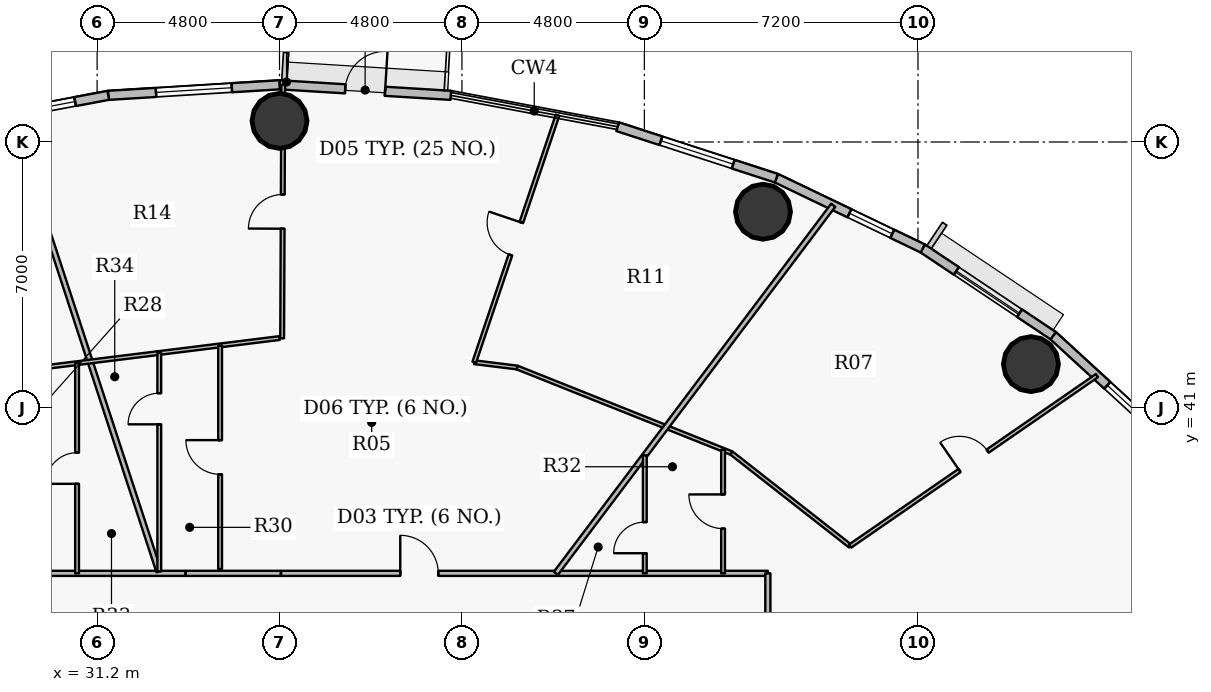
"""IFC4 building model, lengths in metres.
Left out: names, types, materials, properties, quantities, classifications, styles, units other than length and angle.
Written with IfcOpenShell. Run it as: python <this file> out.ifc"""

import sys

from ifc_helpers import new_model, si_unit, direction, frame, frame_2d, origin, origin_2d, place, context, subcontext, project, spatial, rectangle, hollow_circle, extrude, source, transform, mapped, element, fill, save


model = new_model("IFC4")
c1 = context("Model", 3, precision=1e-05, world=origin(), true_north=direction((0.0, 1.0)))
c2 = subcontext(c1, "Body", "Model", "MODEL_VIEW")
j1 = project(units=[si_unit("LENGTHUNIT", "METRE"), si_unit("PLANEANGLEUNIT", "RADIAN")], contexts=[c1])
p1 = place(None, origin())
s1 = spatial("IfcSite", under=j1, at=p1, CompositionType="ELEMENT")
p2 = place(p1, origin())
s2 = spatial("IfcBuilding", under=s1, at=p2, CompositionType="ELEMENT")
p3 = place(p2, frame((0.0, 0.0, 108.45)))
s3 = spatial("IfcBuildingStorey", under=s2, at=p3, CompositionType="ELEMENT", Elevation=108.45)
for number, where, z_axis, x_axis in (
    (1, (55.773, 42.156, 0.0), (0.0, 0.0, 1.0), (1.0, 0.0, 0.0)),
    (2, (48.722, 46.165, 0.0), (0.0, 0.0, 1.0), (1.0, 0.0, 0.0)),
    (3, (36.0, 48.555, 0.0), (0.0, 0.0, 1.0), (1.0, 0.0, 0.0)),
):
    element("IfcColumn", number, at=place(p3, frame(where, z_axis=z_axis, x_axis=x_axis)), inside=s3, PredefinedType="COLUMN", context=c2, shape_type="SweptSolid", body=[
        extrude(hollow_circle(Radius=0.725, WallThickness=0.042, at=origin_2d()), origin(), (0.0, 0.0, 1.0), 3.75),
    ])
p4 = place(p3, frame((56.358, 42.903, 0.0), z_axis=(0.0, 0.0, 1.0), x_axis=(0.737113356241, -0.675769117414, 0.0)))
e4 = element("IfcWall", 4, at=p4, inside=s3, PredefinedType="SOLIDWALL", context=c2, shape_type="SweptSolid", body=[
    extrude(rectangle(XDim=3.976, YDim=0.24, at=frame_2d((1.988, 0.0))), origin(), (0.0, 0.0, 1.0), 3.5),
])
p5 = place(p4, frame((1.933, 0.0, 0.9)))
e5 = element("IfcOpeningElement", 5, at=p5, cuts=e4, PredefinedType="OPENING", context=c2, shape_type="SweptSolid", body=[
    extrude(rectangle(XDim=1.25, YDim=1.65, at=origin_2d()), frame((0.625, 0.13, 0.825), z_axis=(0.0, -1.0, 0.0), x_axis=(1.0, 0.0, 0.0)), (0.0, 0.0, 1.0), 0.26),
])
p6 = place(p3, frame((52.925, 45.199, 0.0), z_axis=(0.0, 0.0, 1.0), x_axis=(0.831221811447, -0.555940914284, 0.0)))
e6 = element("IfcWall", 6, at=p6, inside=s3, PredefinedType="SOLIDWALL", context=c2, shape_type="SweptSolid", body=[
    extrude(rectangle(XDim=4.13, YDim=0.24, at=frame_2d((2.065, 0.0))), origin(), (0.0, 0.0, 1.0), 3.5),
])
p7 = place(p6, frame((1.065, 0.0, 0.9)))
e7 = element("IfcOpeningElement", 7, at=p7, cuts=e6, PredefinedType="OPENING", context=c2, shape_type="SweptSolid", body=[
    extrude(rectangle(XDim=2.0, YDim=1.75, at=origin_2d()), frame((1.0, 0.13, 0.875), z_axis=(0.0, -1.0, 0.0), x_axis=(1.0, 0.0, 0.0)), (0.0, 0.0, 1.0), 0.26),
])
p8 = place(p3, frame((49.074, 47.047, 0.0), z_axis=(0.0, 0.0, 1.0), x_axis=(0.901589935876, -0.432591709962, 0.0)))
e8 = element("IfcWall", 8, at=p8, inside=s3, PredefinedType="SOLIDWALL", context=c2, shape_type="SweptSolid", body=[
    extrude(rectangle(XDim=4.272, YDim=0.24, at=frame_2d((2.136, 0.0))), origin(), (0.0, 0.0, 1.0), 3.5),
])
p9 = place(p8, frame((2.132, 0.0, 0.9)))
e9 = element("IfcOpeningElement", 9, at=p9, cuts=e8, PredefinedType="OPENING", context=c2, shape_type="SweptSolid", body=[
    extrude(rectangle(XDim=1.25, YDim=1.65, at=origin_2d()), frame((0.625, 0.13, 0.825), z_axis=(0.0, -1.0, 0.0), x_axis=(1.0, 0.0, 0.0)), (0.0, 0.0, 1.0), 0.26),
])
p10 = place(p3, frame((44.9, 48.401, 0.0), z_axis=(0.0, 0.0, 1.0), x_axis=(0.951211346073, -0.308540070495, 0.0)))
e10 = element("IfcWall", 10, at=p10, inside=s3, PredefinedType="SOLIDWALL", context=c2, shape_type="SweptSolid", body=[
    extrude(rectangle(XDim=4.388, YDim=0.24, at=frame_2d((2.194, 0.0))), origin(), (0.0, 0.0, 1.0), 3.5),
])
p11 = place(p10, frame((1.194, 0.0, 0.9)))
e11 = element("IfcOpeningElement", 11, at=p11, cuts=e10, PredefinedType="OPENING", context=c2, shape_type="SweptSolid", body=[
    extrude(rectangle(XDim=2.0, YDim=1.75, at=origin_2d()), frame((1.0, 0.13, 0.875), z_axis=(0.0, -1.0, 0.0), x_axis=(1.0, 0.0, 0.0)), (0.0, 0.0, 1.0), 0.26),
])
p12 = place(p3, frame((36.0, 49.505, 0.0), z_axis=(0.0, 0.0, 1.0), x_axis=(0.998107531589, -0.061492726276, 0.0)))
e12 = element("IfcWall", 12, at=p12, inside=s3, PredefinedType="SOLIDWALL", context=c2, shape_type="SweptSolid", body=[
    extrude(rectangle(XDim=4.514, YDim=0.24, at=frame_2d((2.257, 0.0))), origin(), (0.0, 0.0, 1.0), 3.5),
])
p13 = place(p12, frame((1.732, 0.0, 0.0)))
e13 = element("IfcOpeningElement", 13, at=p13, cuts=e12, PredefinedType="OPENING", context=c2, shape_type="SweptSolid", body=[
    extrude(rectangle(XDim=1.05, YDim=2.15, at=origin_2d()), frame((0.525, 0.13, 1.075), z_axis=(0.0, -1.0, 0.0), x_axis=(1.0, 0.0, 0.0)), (0.0, 0.0, 1.0), 0.26),
])
p14 = place(p3, frame((31.494, 49.227, 0.0), z_axis=(0.0, 0.0, 1.0), x_axis=(0.998107531589, 0.061492726276, 0.0)))
e14 = element("IfcWall", 14, at=p14, inside=s3, PredefinedType="SOLIDWALL", context=c2, shape_type="SweptSolid", body=[
    extrude(rectangle(XDim=4.514, YDim=0.24, at=frame_2d((2.257, 0.0))), origin(), (0.0, 0.0, 1.0), 3.5),
])
p15 = place(p14, frame((1.257, 0.0, 0.9)))
e15 = element("IfcOpeningElement", 15, at=p15, cuts=e14, PredefinedType="OPENING", context=c2, shape_type="SweptSolid", body=[
    extrude(rectangle(XDim=2.0, YDim=1.75, at=origin_2d()), frame((1.0, 0.13, 0.875), z_axis=(0.0, -1.0, 0.0), x_axis=(1.0, 0.0, 0.0)), (0.0, 0.0, 1.0), 0.26),
])
p16 = place(p3, frame((27.1, 48.401, 0.0), z_axis=(0.0, 0.0, 1.0), x_axis=(0.982789252177, 0.184730305596, 0.0)))
e16 = element("IfcWall", 16, at=p16, inside=s3, PredefinedType="SOLIDWALL", context=c2, shape_type="SweptSolid", body=[
    extrude(rectangle(XDim=4.471, YDim=0.24, at=frame_2d((2.235, 0.0))), origin(), (0.0, 0.0, 1.0), 3.5),
])
p17 = place(p16, frame((2.333, 0.0, 0.9)))
e17 = element("IfcOpeningElement", 17, at=p17, cuts=e16, PredefinedType="OPENING", context=c2, shape_type="SweptSolid", body=[
    extrude(rectangle(XDim=1.25, YDim=1.65, at=origin_2d()), frame((0.625, 0.13, 0.825), z_axis=(0.0, -1.0, 0.0), x_axis=(1.0, 0.0, 0.0)), (0.0, 0.0, 1.0), 0.26),
])
p18 = place(p3, frame((23.15, 36.65, 0.0), z_axis=(0.0, 0.0, 1.0), x_axis=(1.0, 0.0, 0.0)))
e18 = element("IfcWall", 18, at=p18, inside=s3, PredefinedType="PARTITIONING", context=c2, shape_type="SweptSolid", body=[
    extrude(rectangle(XDim=10.373, YDim=0.135, at=frame_2d((5.187, 0.0))), origin(), (0.0, 0.0, 1.0), 2.935),
])
p19 = place(p3, frame((28.883, 48.741, 0.0), z_axis=(0.0, 0.0, 1.0), x_axis=(0.311090320612, -0.95038035145, 0.0)))
e19 = element("IfcWall", 19, at=p19, inside=s3, PredefinedType="PARTITIONING", context=c2, shape_type="SweptSolid", body=[
    extrude(rectangle(XDim=12.671, YDim=0.135, at=frame_2d((6.335, 0.0))), origin(), (0.0, 0.0, 1.0), 2.935),
])
p20 = place(p3, frame((29.749, 42.066, 0.0), z_axis=(0.0, 0.0, 1.0), x_axis=(0.992395485088, 0.123090215599, 0.0)))
e20 = element("IfcWall", 20, at=p20, inside=s3, PredefinedType="PARTITIONING", context=c2, shape_type="SweptSolid", body=[
    extrude(rectangle(XDim=6.299, YDim=0.1, at=frame_2d((3.15, 0.0))), origin(), (0.0, 0.0, 1.0), 2.935),
])
p21 = place(p3, frame((30.673, 36.65, 0.0), z_axis=(0.0, 0.0, 1.0), x_axis=(0.0, 1.0, 0.0)))
e21 = element("IfcWall", 21, at=p21, inside=s3, PredefinedType="PARTITIONING", context=c2, shape_type="SweptSolid", body=[
    extrude(rectangle(XDim=5.53, YDim=0.1, at=frame_2d((2.765, 0.0))), origin(), (0.0, 0.0, 1.0), 2.935),
])
p22 = place(p21, frame((2.355, 0.0, 0.0)))
e22 = element("IfcOpeningElement", 22, at=p22, cuts=e21, PredefinedType="OPENING", context=c2, shape_type="SweptSolid", body=[
    extrude(rectangle(XDim=0.82, YDim=2.1, at=origin_2d()), frame((0.41, 0.06, 1.05), z_axis=(0.0, -1.0, 0.0), x_axis=(1.0, 0.0, 0.0)), (0.0, 0.0, 1.0), 0.12),
])
p23 = place(p3, frame((32.836, 36.701, 0.0), z_axis=(0.0, 0.0, 1.0), x_axis=(0.0, 1.0, 0.0)))
e23 = element("IfcWall", 23, at=p23, inside=s3, PredefinedType="PARTITIONING", context=c2, shape_type="SweptSolid", body=[
    extrude(rectangle(XDim=5.748, YDim=0.1, at=frame_2d((2.874, 0.0))), origin(), (0.0, 0.0, 1.0), 3.125),
])
p24 = place(p23, frame((3.87, 0.0, 0.0)))
e24 = element("IfcOpeningElement", 24, at=p24, cuts=e23, PredefinedType="OPENING", context=c2, shape_type="SweptSolid", body=[
    extrude(rectangle(XDim=0.82, YDim=2.1, at=origin_2d()), frame((0.41, 0.06, 1.05), z_axis=(0.0, -1.0, 0.0), x_axis=(1.0, 0.0, 0.0)), (0.0, 0.0, 1.0), 0.12),
])
p25 = place(p3, frame((34.436, 36.763, 0.0), z_axis=(0.0, 0.0, 1.0), x_axis=(0.0, 1.0, 0.0)))
e25 = element("IfcWall", 25, at=p25, inside=s3, PredefinedType="PARTITIONING", context=c2, shape_type="SweptSolid", body=[
    extrude(rectangle(XDim=5.884, YDim=0.1, at=frame_2d((2.942, 0.0))), origin(), (0.0, 0.0, 1.0), 3.125),
])
p26 = place(p25, frame((2.492, 0.0, 0.0)))
e26 = element("IfcOpeningElement", 26, at=p26, cuts=e25, PredefinedType="OPENING", context=c2, shape_type="SweptSolid", body=[
    extrude(rectangle(XDim=0.9, YDim=2.1, at=origin_2d()), frame((0.45, 0.06, 1.05), z_axis=(0.0, -1.0, 0.0), x_axis=(1.0, 0.0, 0.0)), (0.0, 0.0, 1.0), 0.12),
])
p27 = place(p3, frame((36.042, 36.65, 0.0), z_axis=(0.0, 0.0, 1.0), x_axis=(1.0, 0.0, 0.0)))
e27 = element("IfcWall", 27, at=p27, inside=s3, PredefinedType="PARTITIONING", context=c2, shape_type="SweptSolid", body=[
    extrude(rectangle(XDim=12.808, YDim=0.135, at=frame_2d((6.404, 0.0))), origin(), (0.0, 0.0, 1.0), 2.935),
])
p28 = place(p27, frame((3.135, 0.0, 0.0)))
e28 = element("IfcOpeningElement", 28, at=p28, cuts=e27, PredefinedType="OPENING", context=c2, shape_type="SweptSolid", body=[
    extrude(rectangle(XDim=1.0, YDim=2.15, at=origin_2d()), frame((0.5, 0.078, 1.075), z_axis=(0.0, -1.0, 0.0), x_axis=(1.0, 0.0, 0.0)), (0.0, 0.0, 1.0), 0.155),
])
p29 = place(p3, frame((36.069, 42.833, 0.0), z_axis=(0.0, 0.0, 1.0), x_axis=(0.004354785612, 0.999990517876, 0.0)))
e29 = element("IfcWall", 29, at=p29, inside=s3, PredefinedType="PARTITIONING", context=c2, shape_type="SweptSolid", body=[
    extrude(rectangle(XDim=6.671, YDim=0.1, at=frame_2d((3.336, 0.0))), origin(), (0.0, 0.0, 1.0), 2.935),
])
p30 = place(p29, frame((2.886, 0.0, 0.0)))
e30 = element("IfcOpeningElement", 30, at=p30, cuts=e29, PredefinedType="OPENING", context=c2, shape_type="SweptSolid", body=[
    extrude(rectangle(XDim=0.9, YDim=2.1, at=origin_2d()), frame((0.45, 0.06, 1.05), z_axis=(0.0, -1.0, 0.0), x_axis=(1.0, 0.0, 0.0)), (0.0, 0.0, 1.0), 0.12),
])
p31 = place(p3, frame((41.125, 42.205, 0.0), z_axis=(0.0, 0.0, 1.0), x_axis=(0.99240961586, -0.122976234894, 0.0)))
e31 = element("IfcWall", 31, at=p31, inside=s3, PredefinedType="PARTITIONING", context=c2, shape_type="SweptSolid", body=[
    extrude(rectangle(XDim=1.135, YDim=0.1, at=frame_2d((0.568, 0.0))), origin(), (0.0, 0.0, 1.0), 3.5),
])
p32 = place(p3, frame((41.125, 42.205, 0.0), z_axis=(0.0, 0.0, 1.0), x_axis=(0.319387131438, 0.947624324441, 0.0)))
e32 = element("IfcWall", 32, at=p32, inside=s3, PredefinedType="PARTITIONING", context=c2, shape_type="SweptSolid", body=[
    extrude(rectangle(XDim=6.858, YDim=0.1, at=frame_2d((3.429, 0.0))), origin(), (0.0, 0.0, 1.0), 2.935),
])
p33 = place(p32, frame((2.979, 0.0, 0.0)))
e33 = element("IfcOpeningElement", 33, at=p33, cuts=e32, PredefinedType="OPENING", context=c2, shape_type="SweptSolid", body=[
    extrude(rectangle(XDim=0.9, YDim=2.1, at=origin_2d()), frame((0.45, 0.06, 1.05), z_axis=(0.0, -1.0, 0.0), x_axis=(1.0, 0.0, 0.0)), (0.0, 0.0, 1.0), 0.12),
])
p34 = place(p3, frame((42.251, 42.066, 0.0), z_axis=(0.0, 0.0, 1.0), x_axis=(0.9288090756, -0.370558633798, 0.0)))
e34 = element("IfcWall", 34, at=p34, inside=s3, PredefinedType="PARTITIONING", context=c2, shape_type="SweptSolid", body=[
    extrude(rectangle(XDim=6.072, YDim=0.1, at=frame_2d((3.036, 0.0))), origin(), (0.0, 0.0, 1.0), 2.935),
])
p35 = place(p3, frame((43.272, 36.65, 0.0), z_axis=(0.0, 0.0, 1.0), x_axis=(0.601821582461, 0.798630567211, 0.0)))
e35 = element("IfcWall", 35, at=p35, inside=s3, PredefinedType="PARTITIONING", context=c2, shape_type="SweptSolid", body=[
    extrude(rectangle(XDim=12.127, YDim=0.135, at=frame_2d((6.063, 0.0))), origin(), (0.0, 0.0, 1.0), 2.935),
])
p36 = place(p3, frame((45.612, 36.65, 0.0), z_axis=(0.0, 0.0, 1.0), x_axis=(0.0, 1.0, 0.0)))
e36 = element("IfcWall", 36, at=p36, inside=s3, PredefinedType="PARTITIONING", context=c2, shape_type="SweptSolid", body=[
    extrude(rectangle(XDim=3.106, YDim=0.1, at=frame_2d((1.553, 0.0))), origin(), (0.0, 0.0, 1.0), 3.5),
])
p37 = place(p36, frame((0.529, 0.0, 0.0)))
e37 = element("IfcOpeningElement", 37, at=p37, cuts=e36, PredefinedType="OPENING", context=c2, shape_type="SweptSolid", body=[
    extrude(rectangle(XDim=0.82, YDim=2.1, at=origin_2d()), frame((0.41, 0.06, 1.05), z_axis=(0.0, -1.0, 0.0), x_axis=(1.0, 0.0, 0.0)), (0.0, 0.0, 1.0), 0.12),
])
p38 = place(p3, frame((47.672, 36.65, 0.0), z_axis=(0.0, 0.0, 1.0), x_axis=(0.0, 1.0, 0.0)))
e38 = element("IfcWall", 38, at=p38, inside=s3, PredefinedType="PARTITIONING", context=c2, shape_type="SweptSolid", body=[
    extrude(rectangle(XDim=3.253, YDim=0.1, at=frame_2d((1.626, 0.0))), origin(), (0.0, 0.0, 1.0), 3.125),
])
p39 = place(p38, frame((1.177, 0.0, 0.0)))
e39 = element("IfcOpeningElement", 39, at=p39, cuts=e38, PredefinedType="OPENING", context=c2, shape_type="SweptSolid", body=[
    extrude(rectangle(XDim=0.9, YDim=2.1, at=origin_2d()), frame((0.45, 0.06, 1.05), z_axis=(0.0, -1.0, 0.0), x_axis=(1.0, 0.0, 0.0)), (0.0, 0.0, 1.0), 0.12),
])
p40 = place(p3, frame((47.891, 39.816, 0.0), z_axis=(0.0, 0.0, 1.0), x_axis=(0.787331052764, -0.616530464254, 0.0)))
e40 = element("IfcWall", 40, at=p40, inside=s3, PredefinedType="PARTITIONING", context=c2, shape_type="SweptSolid", body=[
    extrude(rectangle(XDim=3.969, YDim=0.1, at=frame_2d((1.985, 0.0))), origin(), (0.0, 0.0, 1.0), 2.935),
])
p41 = place(p3, frame((48.85, 17.35, 0.0), z_axis=(0.0, 0.0, 1.0), x_axis=(0.0, 1.0, 0.0)))
e41 = element("IfcWall", 41, at=p41, inside=s3, PredefinedType="PARTITIONING", context=c2, shape_type="SweptSolid", body=[
    extrude(rectangle(XDim=19.3, YDim=0.135, at=frame_2d((9.65, 0.0))), origin(), (0.0, 0.0, 1.0), 2.935),
])
p42 = place(p41, frame((4.107, 0.0, 0.0)))
e42 = element("IfcOpeningElement", 42, at=p42, cuts=e41, PredefinedType="OPENING", context=c2, shape_type="SweptSolid", body=[
    extrude(rectangle(XDim=1.0, YDim=2.15, at=origin_2d()), frame((0.5, 0.078, 1.075), z_axis=(0.0, -1.0, 0.0), x_axis=(1.0, 0.0, 0.0)), (0.0, 0.0, 1.0), 0.155),
])
p43 = place(p41, frame((13.717, 0.0, 0.0)))
e43 = element("IfcOpeningElement", 43, at=p43, cuts=e41, PredefinedType="OPENING", context=c2, shape_type="SweptSolid", body=[
    extrude(rectangle(XDim=1.0, YDim=2.15, at=origin_2d()), frame((0.5, 0.078, 1.075), z_axis=(0.0, -1.0, 0.0), x_axis=(1.0, 0.0, 0.0)), (0.0, 0.0, 1.0), 0.155),
])
p44 = place(p3, frame((51.016, 37.368, 0.0), z_axis=(0.0, 0.0, 1.0), x_axis=(0.822878649823, 0.568217148338, 0.0)))
e44 = element("IfcWall", 44, at=p44, inside=s3, PredefinedType="PARTITIONING", context=c2, shape_type="SweptSolid", body=[
    extrude(rectangle(XDim=7.893, YDim=0.1, at=frame_2d((3.946, 0.0))), origin(), (0.0, 0.0, 1.0), 2.935),
])
p45 = place(p44, frame((3.497, 0.0, 0.0)))
e45 = element("IfcOpeningElement", 45, at=p45, cuts=e44, PredefinedType="OPENING", context=c2, shape_type="SweptSolid", body=[
    extrude(rectangle(XDim=0.9, YDim=2.1, at=origin_2d()), frame((0.45, 0.06, 1.05), z_axis=(0.0, -1.0, 0.0), x_axis=(1.0, 0.0, 0.0)), (0.0, 0.0, 1.0), 0.12),
])
p46 = place(p3, frame((33.533, 36.65, 0.0), z_axis=(0.0, 0.0, 1.0), x_axis=(1.0, 0.0, 0.0)))
e46 = element("IfcWall", 46, at=p46, inside=s3, PredefinedType="PARTITIONING", context=c2, shape_type="SweptSolid", body=[
    extrude(rectangle(XDim=2.499, YDim=0.135, at=frame_2d((1.25, 0.0))), origin(), (0.0, 0.0, 1.0), 2.935),
])
m1 = source(origin(), c2, "Body", "SweptSolid", [
    extrude(rectangle(XDim=1.25, YDim=1.65, at=origin_2d()), frame((0.625, 0.03, 0.825), z_axis=(0.0, -1.0, 0.0), x_axis=(1.0, 0.0, 0.0)), (0.0, 0.0, 1.0), 0.06),
])
p47 = place(p5, origin())
e47 = element("IfcWindow", 47, at=p47, inside=s3, PartitioningType="SINGLE_PANEL", PredefinedType="WINDOW", context=c2, shape_type="MappedRepresentation", body=[
    mapped(m1, transform((0.0, 0.0, 0.0), x_axis=(1.0, 0.0, 0.0), y_axis=(0.0, 1.0, 0.0), z_axis=(0.0, 0.0, 1.0), scale=1.0)),
])
fill(e5, e47)
m2 = source(origin(), c2, "Body", "SweptSolid", [
    extrude(rectangle(XDim=2.0, YDim=1.75, at=origin_2d()), frame((1.0, 0.03, 0.875), z_axis=(0.0, -1.0, 0.0), x_axis=(1.0, 0.0, 0.0)), (0.0, 0.0, 1.0), 0.06),
])
p48 = place(p7, origin())
e48 = element("IfcWindow", 48, at=p48, inside=s3, PartitioningType="DOUBLE_PANEL_VERTICAL", PredefinedType="WINDOW", context=c2, shape_type="MappedRepresentation", body=[
    mapped(m2, transform((0.0, 0.0, 0.0), x_axis=(1.0, 0.0, 0.0), y_axis=(0.0, 1.0, 0.0), z_axis=(0.0, 0.0, 1.0), scale=1.0)),
])
fill(e7, e48)
p49 = place(p9, origin())
e49 = element("IfcWindow", 49, at=p49, inside=s3, PartitioningType="SINGLE_PANEL", PredefinedType="WINDOW", context=c2, shape_type="MappedRepresentation", body=[
    mapped(m1, transform((0.0, 0.0, 0.0), x_axis=(1.0, 0.0, 0.0), y_axis=(0.0, 1.0, 0.0), z_axis=(0.0, 0.0, 1.0), scale=1.0)),
])
fill(e9, e49)
p50 = place(p11, origin())
e50 = element("IfcWindow", 50, at=p50, inside=s3, PartitioningType="DOUBLE_PANEL_VERTICAL", PredefinedType="WINDOW", context=c2, shape_type="MappedRepresentation", body=[
    mapped(m2, transform((0.0, 0.0, 0.0), x_axis=(1.0, 0.0, 0.0), y_axis=(0.0, 1.0, 0.0), z_axis=(0.0, 0.0, 1.0), scale=1.0)),
])
fill(e11, e50)
m3 = source(origin(), c2, "Body", "SweptSolid", [
    extrude(rectangle(XDim=1.05, YDim=2.15, at=origin_2d()), frame((0.525, 0.025, 1.075), z_axis=(0.0, -1.0, 0.0), x_axis=(1.0, 0.0, 0.0)), (0.0, 0.0, 1.0), 0.05),
])
p51 = place(p13, origin())
e51 = element("IfcDoor", 51, at=p51, inside=s3, OperationType="SINGLE_SWING_RIGHT", PredefinedType="DOOR", context=c2, shape_type="MappedRepresentation", body=[
    mapped(m3, transform((0.0, 0.0, 0.0), x_axis=(1.0, 0.0, 0.0), y_axis=(0.0, 1.0, 0.0), z_axis=(0.0, 0.0, 1.0), scale=1.0)),
])
fill(e13, e51)
p52 = place(p15, origin())
e52 = element("IfcWindow", 52, at=p52, inside=s3, PartitioningType="DOUBLE_PANEL_VERTICAL", PredefinedType="WINDOW", context=c2, shape_type="MappedRepresentation", body=[
    mapped(m2, transform((0.0, 0.0, 0.0), x_axis=(1.0, 0.0, 0.0), y_axis=(0.0, 1.0, 0.0), z_axis=(0.0, 0.0, 1.0), scale=1.0)),
])
fill(e15, e52)
p53 = place(p17, origin())
e53 = element("IfcWindow", 53, at=p53, inside=s3, PartitioningType="SINGLE_PANEL", PredefinedType="WINDOW", context=c2, shape_type="MappedRepresentation", body=[
    mapped(m1, transform((0.0, 0.0, 0.0), x_axis=(1.0, 0.0, 0.0), y_axis=(0.0, 1.0, 0.0), z_axis=(0.0, 0.0, 1.0), scale=1.0)),
])
fill(e17, e53)
m4 = source(origin(), c2, "Body", "SweptSolid", [
    extrude(rectangle(XDim=1.0, YDim=2.15, at=origin_2d()), frame((0.5, 0.025, 1.075), z_axis=(0.0, -1.0, 0.0), x_axis=(1.0, 0.0, 0.0)), (0.0, 0.0, 1.0), 0.05),
])
p54 = place(p28, origin())
e54 = element("IfcDoor", 54, at=p54, inside=s3, OperationType="SINGLE_SWING_LEFT", PredefinedType="DOOR", context=c2, shape_type="MappedRepresentation", body=[
    mapped(m4, transform((0.0, 0.0, 0.0), x_axis=(1.0, 0.0, 0.0), y_axis=(0.0, 1.0, 0.0), z_axis=(0.0, 0.0, 1.0), scale=1.0)),
])
fill(e28, e54)
m5 = source(origin(), c2, "Body", "SweptSolid", [
    extrude(rectangle(XDim=0.9, YDim=2.1, at=origin_2d()), frame((0.45, 0.025, 1.05), z_axis=(0.0, -1.0, 0.0), x_axis=(1.0, 0.0, 0.0)), (0.0, 0.0, 1.0), 0.05),
])
p55 = place(p33, origin())
e55 = element("IfcDoor", 55, at=p55, inside=s3, OperationType="SINGLE_SWING_RIGHT", PredefinedType="DOOR", context=c2, shape_type="MappedRepresentation", body=[
    mapped(m5, transform((0.0, 0.0, 0.0), x_axis=(1.0, 0.0, 0.0), y_axis=(0.0, 1.0, 0.0), z_axis=(0.0, 0.0, 1.0), scale=1.0)),
])
fill(e33, e55)
p56 = place(p30, origin())
e56 = element("IfcDoor", 56, at=p56, inside=s3, OperationType="SINGLE_SWING_LEFT", PredefinedType="DOOR", context=c2, shape_type="MappedRepresentation", body=[
    mapped(m5, transform((0.0, 0.0, 0.0), x_axis=(1.0, 0.0, 0.0), y_axis=(0.0, 1.0, 0.0), z_axis=(0.0, 0.0, 1.0), scale=1.0)),
])
fill(e30, e56)
p57 = place(p26, origin())
e57 = element("IfcDoor", 57, at=p57, inside=s3, OperationType="SINGLE_SWING_RIGHT", PredefinedType="DOOR", context=c2, shape_type="MappedRepresentation", body=[
    mapped(m5, transform((0.0, 0.0, 0.0), x_axis=(1.0, 0.0, 0.0), y_axis=(0.0, 1.0, 0.0), z_axis=(0.0, 0.0, 1.0), scale=1.0)),
])
fill(e26, e57)
m6 = source(origin(), c2, "Body", "SweptSolid", [
    extrude(rectangle(XDim=0.82, YDim=2.1, at=origin_2d()), frame((0.41, 0.025, 1.05), z_axis=(0.0, -1.0, 0.0), x_axis=(1.0, 0.0, 0.0)), (0.0, 0.0, 1.0), 0.05),
])
p58 = place(p24, origin())
e58 = element("IfcDoor", 58, at=p58, inside=s3, OperationType="SINGLE_SWING_LEFT", PredefinedType="DOOR", context=c2, shape_type="MappedRepresentation", body=[
    mapped(m6, transform((0.0, 0.0, 0.0), x_axis=(1.0, 0.0, 0.0), y_axis=(0.0, 1.0, 0.0), z_axis=(0.0, 0.0, 1.0), scale=1.0)),
])
fill(e24, e58)
p59 = place(p22, origin())
e59 = element("IfcDoor", 59, at=p59, inside=s3, OperationType="SINGLE_SWING_LEFT", PredefinedType="DOOR", context=c2, shape_type="MappedRepresentation", body=[
    mapped(m6, transform((0.0, 0.0, 0.0), x_axis=(1.0, 0.0, 0.0), y_axis=(0.0, 1.0, 0.0), z_axis=(0.0, 0.0, 1.0), scale=1.0)),
])
fill(e22, e59)
p60 = place(p45, origin())
e60 = element("IfcDoor", 60, at=p60, inside=s3, OperationType="SINGLE_SWING_LEFT", PredefinedType="DOOR", context=c2, shape_type="MappedRepresentation", body=[
    mapped(m5, transform((0.0, 0.0, 0.0), x_axis=(1.0, 0.0, 0.0), y_axis=(0.0, 1.0, 0.0), z_axis=(0.0, 0.0, 1.0), scale=1.0)),
])
fill(e45, e60)
p61 = place(p39, origin())
e61 = element("IfcDoor", 61, at=p61, inside=s3, OperationType="SINGLE_SWING_RIGHT", PredefinedType="DOOR", context=c2, shape_type="MappedRepresentation", body=[
    mapped(m5, transform((0.0, 0.0, 0.0), x_axis=(1.0, 0.0, 0.0), y_axis=(0.0, 1.0, 0.0), z_axis=(0.0, 0.0, 1.0), scale=1.0)),
])
fill(e39, e61)
p62 = place(p37, origin())
e62 = element("IfcDoor", 62, at=p62, inside=s3, OperationType="SINGLE_SWING_LEFT", PredefinedType="DOOR", context=c2, shape_type="MappedRepresentation", body=[
    mapped(m6, transform((0.0, 0.0, 0.0), x_axis=(1.0, 0.0, 0.0), y_axis=(0.0, 1.0, 0.0), z_axis=(0.0, 0.0, 1.0), scale=1.0)),
])
fill(e37, e62)
save(model, sys.argv[1])
